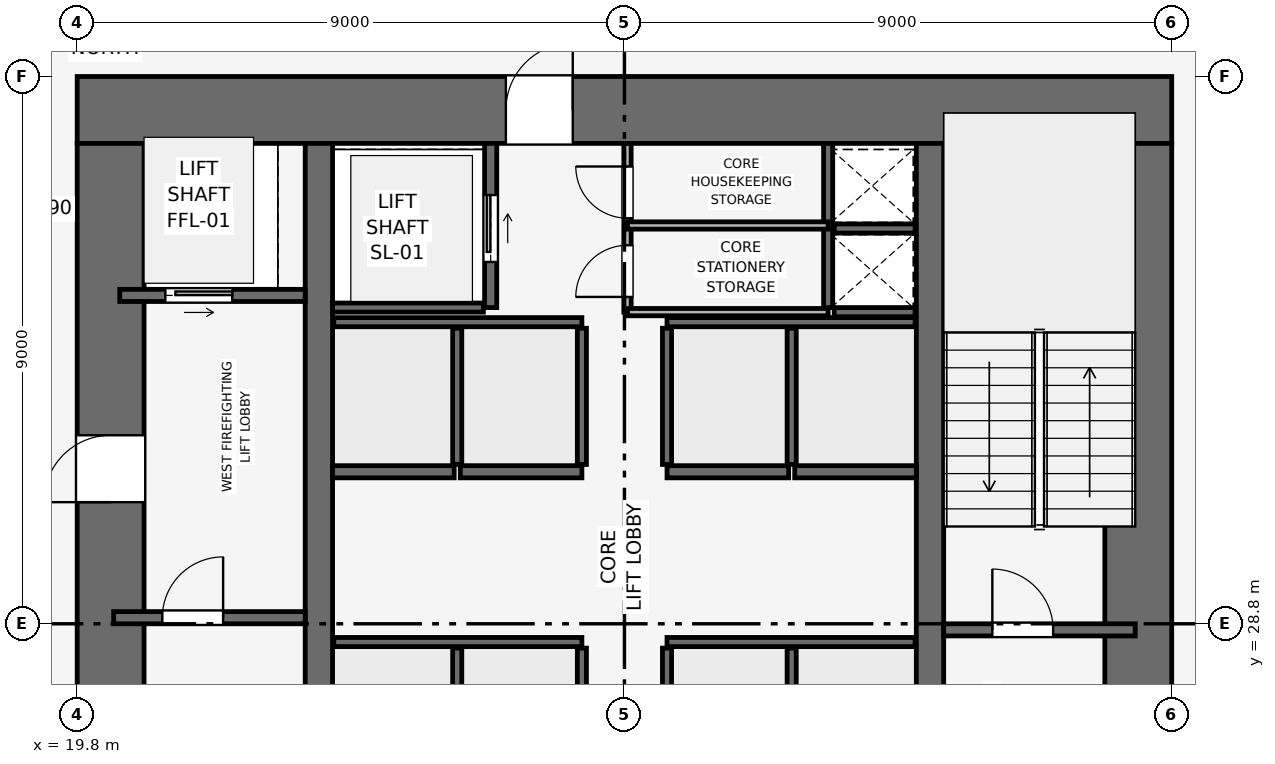
"""IFC4 building model, lengths in metres.
Left out: names, types, materials, properties, quantities, classifications, styles, units other than length and angle.
Written with IfcOpenShell. Run it as: python <this file> out.ifc"""

import sys

from ifc_helpers import new_model, si_unit, direction, frame, frame_2d, origin, place, context, subcontext, project, spatial, rectangle, extrude, element, fill, save


model = new_model("IFC4")
c1 = context("Model", 3, precision=1e-05, world=origin(), true_north=direction((0.0, 1.0)))
c2 = subcontext(c1, "Body", "Model", "MODEL_VIEW")
j1 = project(units=[si_unit("LENGTHUNIT", "METRE"), si_unit("PLANEANGLEUNIT", "RADIAN")], contexts=[c1])
p1 = place(None, origin())
s1 = spatial("IfcSite", under=j1, at=p1, CompositionType="ELEMENT")
p2 = place(p1, origin())
s2 = spatial("IfcBuilding", under=s1, at=p2, CompositionType="ELEMENT")
p3 = place(p2, frame((0.0, 0.0, 57.3)))
s3 = spatial("IfcBuildingStorey", under=s2, at=p3, CompositionType="ELEMENT", Elevation=57.3)
p4 = place(p3, frame((19.8, 37.25, 0.0), z_axis=(0.0, 0.0, 1.0), x_axis=(1.0, 0.0, 0.0)))
e1 = element("IfcWall", 1, at=p4, inside=s3, PredefinedType="SHEAR", context=c2, shape_type="SweptSolid", body=[
    extrude(rectangle(XDim=18.0, YDim=1.1, at=frame_2d((9.0, 0.0))), origin(), (0.0, 0.0, 1.0), 3.9),
])
p5 = place(p4, frame((7.05, 0.0, 0.0)))
e2 = element("IfcOpeningElement", 2, at=p5, cuts=e1, PredefinedType="OPENING", context=c2, shape_type="SweptSolid", body=[
    extrude(rectangle(XDim=1.1, YDim=2.15, at=frame_2d((0.55, 1.075))), frame((0.0, 0.56, 0.0), z_axis=(0.0, -1.0, 0.0), x_axis=(1.0, 0.0, 0.0)), (0.0, 0.0, 1.0), 1.12),
])
p6 = place(p3, frame((20.35, 20.9, 0.0), z_axis=(0.0, 0.0, 1.0), x_axis=(0.0, 1.0, 0.0)))
e3 = element("IfcWall", 3, at=p6, inside=s3, PredefinedType="SHEAR", context=c2, shape_type="SweptSolid", body=[
    extrude(rectangle(XDim=15.8, YDim=1.1, at=frame_2d((7.9, 0.0))), origin(), (0.0, 0.0, 1.0), 3.9),
])
p7 = place(p6, frame((9.9, 0.0, 0.0)))
e4 = element("IfcOpeningElement", 4, at=p7, cuts=e3, PredefinedType="OPENING", context=c2, shape_type="SweptSolid", body=[
    extrude(rectangle(XDim=1.1, YDim=2.15, at=frame_2d((0.55, 1.075))), frame((0.0, 0.56, 0.0), z_axis=(0.0, -1.0, 0.0), x_axis=(1.0, 0.0, 0.0)), (0.0, 0.0, 1.0), 1.12),
])
p8 = place(p3, frame((37.25, 20.9, 0.0), z_axis=(0.0, 0.0, 1.0), x_axis=(0.0, 1.0, 0.0)))
e5 = element("IfcWall", 5, at=p8, inside=s3, PredefinedType="SHEAR", context=c2, shape_type="SweptSolid", body=[
    extrude(rectangle(XDim=15.8, YDim=1.1, at=frame_2d((7.9, 0.0))), origin(), (0.0, 0.0, 1.0), 3.9),
])
p9 = place(p8, frame((4.4, 0.0, 0.0)))
e6 = element("IfcOpeningElement", 6, at=p9, cuts=e5, PredefinedType="OPENING", context=c2, shape_type="SweptSolid", body=[
    extrude(rectangle(XDim=1.1, YDim=2.15, at=frame_2d((0.55, 1.075))), frame((0.0, 0.56, 0.0), z_axis=(0.0, -1.0, 0.0), x_axis=(1.0, 0.0, 0.0)), (0.0, 0.0, 1.0), 1.12),
])
for number, where, z_axis, x_axis in (
    (7, (23.775, 20.9, 0.0), (0.0, 0.0, 1.0), (0.0, 1.0, 0.0)),
    (8, (33.825, 20.9, 0.0), (0.0, 0.0, 1.0), (0.0, 1.0, 0.0)),
):
    element("IfcWall", number, at=place(p3, frame(where, z_axis=z_axis, x_axis=x_axis)), inside=s3, PredefinedType="SHEAR", context=c2, shape_type="SweptSolid", body=[
        extrude(rectangle(XDim=15.8, YDim=0.45, at=frame_2d((7.9, 0.0))), origin(), (0.0, 0.0, 1.0), 3.9),
    ])
p10 = place(p3, frame((20.4, 28.9, 0.0), z_axis=(0.0, 0.0, 1.0), x_axis=(1.0, 0.0, 0.0)))
e9 = element("IfcWall", 9, at=p10, inside=s3, PredefinedType="SHEAR", context=c2, shape_type="SweptSolid", body=[
    extrude(rectangle(XDim=3.15, YDim=0.2, at=frame_2d((1.575, 0.0))), origin(), (0.0, 0.0, 1.0), 3.65),
])
p11 = place(p10, frame((0.8, 0.0, 0.0)))
e10 = element("IfcOpeningElement", 10, at=p11, cuts=e9, PredefinedType="OPENING", context=c2, shape_type="SweptSolid", body=[
    extrude(rectangle(XDim=1.0, YDim=2.1, at=frame_2d((0.5, 1.05))), frame((0.0, 0.11, 0.0), z_axis=(0.0, -1.0, 0.0), x_axis=(1.0, 0.0, 0.0)), (0.0, 0.0, 1.0), 0.22),
])
p12 = place(p3, frame((34.05, 28.7, 0.0), z_axis=(0.0, 0.0, 1.0), x_axis=(1.0, 0.0, 0.0)))
e11 = element("IfcWall", 11, at=p12, inside=s3, PredefinedType="SHEAR", context=c2, shape_type="SweptSolid", body=[
    extrude(rectangle(XDim=3.15, YDim=0.2, at=frame_2d((1.575, 0.0))), origin(), (0.0, 0.0, 1.0), 3.65),
])
p13 = place(p12, frame((0.8, 0.0, 0.0)))
e12 = element("IfcOpeningElement", 12, at=p13, cuts=e11, PredefinedType="OPENING", context=c2, shape_type="SweptSolid", body=[
    extrude(rectangle(XDim=1.0, YDim=2.1, at=frame_2d((0.5, 1.05))), frame((0.0, 0.11, 0.0), z_axis=(0.0, -1.0, 0.0), x_axis=(1.0, 0.0, 0.0)), (0.0, 0.0, 1.0), 0.22),
])
p14 = place(p3, frame((32.15, 34.0, 0.0), z_axis=(0.0, 0.0, 1.0), x_axis=(0.0, 1.0, 0.0)))
e13 = element("IfcWall", 13, at=p14, inside=s3, PredefinedType="SHEAR", context=c2, shape_type="SweptSolid", body=[
    extrude(rectangle(XDim=2.7, YDim=0.15, at=frame_2d((1.35, 0.0))), origin(), (0.0, 0.0, 1.0), 3.65),
])
for number, where, z_axis, x_axis in (
    (14, (32.25, 33.925, 0.0), (0.0, 0.0, 1.0), (1.0, 0.0, 0.0)),
    (15, (32.25, 35.3, 0.0), (0.0, 0.0, 1.0), (1.0, 0.0, 0.0)),
):
    element("IfcWall", number, at=place(p3, frame(where, z_axis=z_axis, x_axis=x_axis)), inside=s3, PredefinedType="SHEAR", context=c2, shape_type="SweptSolid", body=[
        extrude(rectangle(XDim=1.33, YDim=0.15, at=frame_2d((0.665, 0.0))), origin(), (0.0, 0.0, 1.0), 3.65),
    ])
p15 = place(p3, frame((20.5, 34.2, 0.0), z_axis=(0.0, 0.0, 1.0), x_axis=(1.0, 0.0, 0.0)))
e16 = element("IfcWall", 16, at=p15, inside=s3, PredefinedType="SHEAR", context=c2, shape_type="SweptSolid", body=[
    extrude(rectangle(XDim=3.05, YDim=0.2, at=frame_2d((1.525, 0.0))), origin(), (0.0, 0.0, 1.0), 3.65),
])
p16 = place(p15, frame((0.75, 0.0, 0.0)))
e17 = element("IfcOpeningElement", 17, at=p16, cuts=e16, PredefinedType="OPENING", context=c2, shape_type="SweptSolid", body=[
    extrude(rectangle(XDim=1.1, YDim=2.15, at=frame_2d((0.55, 1.075))), frame((0.0, 0.11, 0.0), z_axis=(0.0, -1.0, 0.0), x_axis=(1.0, 0.0, 0.0)), (0.0, 0.0, 1.0), 0.22),
])
p17 = place(p3, frame((26.6, 34.0, 0.0), z_axis=(0.0, 0.0, 1.0), x_axis=(0.0, 1.0, 0.0)))
e18 = element("IfcWall", 18, at=p17, inside=s3, PredefinedType="SHEAR", context=c2, shape_type="SweptSolid", body=[
    extrude(rectangle(XDim=2.7, YDim=0.2, at=frame_2d((1.35, 0.0))), origin(), (0.0, 0.0, 1.0), 3.65),
])
p18 = place(p17, frame((0.75, 0.0, 0.0)))
e19 = element("IfcOpeningElement", 19, at=p18, cuts=e18, PredefinedType="OPENING", context=c2, shape_type="SweptSolid", body=[
    extrude(rectangle(XDim=1.1, YDim=2.15, at=frame_2d((0.55, 1.075))), frame((0.0, 0.11, 0.0), z_axis=(0.0, -1.0, 0.0), x_axis=(1.0, 0.0, 0.0)), (0.0, 0.0, 1.0), 0.22),
])
p19 = place(p3, frame((24.0, 34.0, 0.0), z_axis=(0.0, 0.0, 1.0), x_axis=(1.0, 0.0, 0.0)))
e20 = element("IfcWall", 20, at=p19, inside=s3, PredefinedType="SHEAR", context=c2, shape_type="SweptSolid", body=[
    extrude(rectangle(XDim=2.48, YDim=0.15, at=frame_2d((1.24, 0.0))), origin(), (0.0, 0.0, 1.0), 3.65),
])
for number, where, z_axis, x_axis in (
    (21, (24.0, 31.3, 0.0), (0.0, 0.0, 1.0), (1.0, 0.0, 0.0)),
    (22, (26.1, 31.3, 0.0), (0.0, 0.0, 1.0), (1.0, 0.0, 0.0)),
    (23, (29.5, 31.3, 0.0), (0.0, 0.0, 1.0), (1.0, 0.0, 0.0)),
    (24, (31.6, 31.3, 0.0), (0.0, 0.0, 1.0), (1.0, 0.0, 0.0)),
):
    element("IfcWall", number, at=place(p3, frame(where, z_axis=z_axis, x_axis=x_axis)), inside=s3, PredefinedType="SHEAR", context=c2, shape_type="SweptSolid", body=[
        extrude(rectangle(XDim=2.0, YDim=0.2, at=frame_2d((1.0, 0.0))), origin(), (0.0, 0.0, 1.0), 3.65),
    ])
for number, where, z_axis, x_axis in (
    (25, (24.02, 28.5, 0.0), (0.0, 0.0, 1.0), (1.0, 0.0, 0.0)),
    (26, (29.5, 28.5, 0.0), (0.0, 0.0, 1.0), (1.0, 0.0, 0.0)),
):
    element("IfcWall", number, at=place(p3, frame(where, z_axis=z_axis, x_axis=x_axis)), inside=s3, PredefinedType="SHEAR", context=c2, shape_type="SweptSolid", body=[
        extrude(rectangle(XDim=4.08, YDim=0.15, at=frame_2d((2.04, 0.0))), origin(), (0.0, 0.0, 1.0), 3.65),
    ])
for number, where, z_axis, x_axis in (
    (27, (26.05, 26.12, 0.0), (0.0, 0.0, 1.0), (0.0, 1.0, 0.0)),
    (28, (28.1, 26.12, 0.0), (0.0, 0.0, 1.0), (0.0, 1.0, 0.0)),
    (29, (29.5, 26.12, 0.0), (0.0, 0.0, 1.0), (0.0, 1.0, 0.0)),
    (30, (31.55, 26.12, 0.0), (0.0, 0.0, 1.0), (0.0, 1.0, 0.0)),
):
    element("IfcWall", number, at=place(p3, frame(where, z_axis=z_axis, x_axis=x_axis)), inside=s3, PredefinedType="SHEAR", context=c2, shape_type="SweptSolid", body=[
        extrude(rectangle(XDim=2.28, YDim=0.15, at=frame_2d((1.14, 0.0))), origin(), (0.0, 0.0, 1.0), 3.65),
    ])
for number, where, z_axis, x_axis in (
    (31, (24.02, 33.76, 0.0), (0.0, 0.0, 1.0), (1.0, 0.0, 0.0)),
    (32, (29.5, 33.76, 0.0), (0.0, 0.0, 1.0), (1.0, 0.0, 0.0)),
):
    element("IfcWall", number, at=place(p3, frame(where, z_axis=z_axis, x_axis=x_axis)), inside=s3, PredefinedType="SHEAR", context=c2, shape_type="SweptSolid", body=[
        extrude(rectangle(XDim=4.08, YDim=0.15, at=frame_2d((2.04, 0.0))), origin(), (0.0, 0.0, 1.0), 3.65),
    ])
for number, where, z_axis, x_axis in (
    (33, (26.05, 31.42, 0.0), (0.0, 0.0, 1.0), (0.0, 1.0, 0.0)),
    (34, (28.1, 31.42, 0.0), (0.0, 0.0, 1.0), (0.0, 1.0, 0.0)),
    (35, (29.5, 31.42, 0.0), (0.0, 0.0, 1.0), (0.0, 1.0, 0.0)),
    (36, (31.55, 31.42, 0.0), (0.0, 0.0, 1.0), (0.0, 1.0, 0.0)),
):
    element("IfcWall", number, at=place(p3, frame(where, z_axis=z_axis, x_axis=x_axis)), inside=s3, PredefinedType="SHEAR", context=c2, shape_type="SweptSolid", body=[
        extrude(rectangle(XDim=2.24, YDim=0.15, at=frame_2d((1.12, 0.0))), origin(), (0.0, 0.0, 1.0), 3.65),
    ])
p20 = place(p3, frame((28.85, 33.925, 0.0), z_axis=(0.0, 0.0, 1.0), x_axis=(0.0, 1.0, 0.0)))
e37 = element("IfcWall", 37, at=p20, inside=s3, PredefinedType="PARTITIONING", context=c2, shape_type="SweptSolid", body=[
    extrude(rectangle(XDim=2.775, YDim=0.12, at=frame_2d((1.387, 0.0))), origin(), (0.0, 0.0, 1.0), 3.65),
])
p21 = place(p20, frame((0.25, 0.0, 0.0)))
e38 = element("IfcOpeningElement", 38, at=p21, cuts=e37, PredefinedType="OPENING", context=c2, shape_type="SweptSolid", body=[
    extrude(rectangle(XDim=0.85, YDim=2.1, at=frame_2d((0.425, 1.05))), frame((0.0, 0.07, 0.0), z_axis=(0.0, -1.0, 0.0), x_axis=(1.0, 0.0, 0.0)), (0.0, 0.0, 1.0), 0.14),
])
p22 = place(p20, frame((1.545, 0.0, 0.0)))
e39 = element("IfcOpeningElement", 39, at=p22, cuts=e37, PredefinedType="OPENING", context=c2, shape_type="SweptSolid", body=[
    extrude(rectangle(XDim=0.85, YDim=2.1, at=frame_2d((0.425, 1.05))), frame((0.0, 0.07, 0.0), z_axis=(0.0, -1.0, 0.0), x_axis=(1.0, 0.0, 0.0)), (0.0, 0.0, 1.0), 0.14),
])
for number, where, z_axis, x_axis in (
    (40, (28.85, 35.35, 0.0), (0.0, 0.0, 1.0), (1.0, 0.0, 0.0)),
    (41, (28.85, 33.925, 0.0), (0.0, 0.0, 1.0), (1.0, 0.0, 0.0)),
):
    element("IfcWall", number, at=place(p3, frame(where, z_axis=z_axis, x_axis=x_axis)), inside=s3, PredefinedType="PARTITIONING", context=c2, shape_type="SweptSolid", body=[
        extrude(rectangle(XDim=3.3, YDim=0.12, at=frame_2d((1.65, 0.0))), origin(), (0.0, 0.0, 1.0), 3.65),
    ])
p23 = place(p11, origin())
e42 = element("IfcDoor", 42, at=p23, inside=s3, OperationType="SINGLE_SWING_RIGHT", PredefinedType="DOOR", context=c2, shape_type="SweptSolid", body=[
    extrude(rectangle(XDim=1.0, YDim=2.1, at=frame_2d((0.5, 1.05))), frame((0.0, 0.025, 0.0), z_axis=(0.0, -1.0, 0.0), x_axis=(1.0, 0.0, 0.0)), (0.0, 0.0, 1.0), 0.05),
])
fill(e10, e42)
p24 = place(p13, origin())
e43 = element("IfcDoor", 43, at=p24, inside=s3, OperationType="SINGLE_SWING_LEFT", PredefinedType="DOOR", context=c2, shape_type="SweptSolid", body=[
    extrude(rectangle(XDim=1.0, YDim=2.1, at=frame_2d((0.5, 1.05))), frame((0.0, 0.025, 0.0), z_axis=(0.0, -1.0, 0.0), x_axis=(1.0, 0.0, 0.0)), (0.0, 0.0, 1.0), 0.05),
])
fill(e12, e43)
p25 = place(p16, origin())
e44 = element("IfcDoor", 44, at=p25, inside=s3, OperationType="SLIDING_TO_RIGHT", PredefinedType="DOOR", context=c2, shape_type="SweptSolid", body=[
    extrude(rectangle(XDim=1.1, YDim=2.15, at=frame_2d((0.55, 1.075))), frame((0.0, 0.025, 0.0), z_axis=(0.0, -1.0, 0.0), x_axis=(1.0, 0.0, 0.0)), (0.0, 0.0, 1.0), 0.05),
])
fill(e17, e44)
p26 = place(p18, origin())
e45 = element("IfcDoor", 45, at=p26, inside=s3, OperationType="SLIDING_TO_RIGHT", PredefinedType="DOOR", context=c2, shape_type="SweptSolid", body=[
    extrude(rectangle(XDim=1.1, YDim=2.15, at=frame_2d((0.55, 1.075))), frame((0.0, 0.025, 0.0), z_axis=(0.0, -1.0, 0.0), x_axis=(1.0, 0.0, 0.0)), (0.0, 0.0, 1.0), 0.05),
])
fill(e19, e45)
p27 = place(p21, origin())
e46 = element("IfcDoor", 46, at=p27, inside=s3, OperationType="SINGLE_SWING_LEFT", PredefinedType="DOOR", context=c2, shape_type="SweptSolid", body=[
    extrude(rectangle(XDim=0.85, YDim=2.1, at=frame_2d((0.425, 1.05))), frame((0.0, 0.025, 0.0), z_axis=(0.0, -1.0, 0.0), x_axis=(1.0, 0.0, 0.0)), (0.0, 0.0, 1.0), 0.05),
])
fill(e38, e46)
p28 = place(p22, origin())
e47 = element("IfcDoor", 47, at=p28, inside=s3, OperationType="SINGLE_SWING_RIGHT", PredefinedType="DOOR", context=c2, shape_type="SweptSolid", body=[
    extrude(rectangle(XDim=0.85, YDim=2.1, at=frame_2d((0.425, 1.05))), frame((0.0, 0.025, 0.0), z_axis=(0.0, -1.0, 0.0), x_axis=(1.0, 0.0, 0.0)), (0.0, 0.0, 1.0), 0.05),
])
fill(e39, e47)
p29 = place(p7, origin())
e48 = element("IfcDoor", 48, at=p29, inside=s3, OperationType="SINGLE_SWING_LEFT", PredefinedType="DOOR", context=c2, shape_type="SweptSolid", body=[
    extrude(rectangle(XDim=1.1, YDim=2.15, at=frame_2d((0.55, 1.075))), frame((0.0, 0.025, 0.0), z_axis=(0.0, -1.0, 0.0), x_axis=(1.0, 0.0, 0.0)), (0.0, 0.0, 1.0), 0.05),
])
fill(e4, e48)
p30 = place(p5, origin())
e49 = element("IfcDoor", 49, at=p30, inside=s3, OperationType="SINGLE_SWING_RIGHT", PredefinedType="DOOR", context=c2, shape_type="SweptSolid", body=[
    extrude(rectangle(XDim=1.1, YDim=2.15, at=frame_2d((0.55, 1.075))), frame((0.0, 0.025, 0.0), z_axis=(0.0, -1.0, 0.0), x_axis=(1.0, 0.0, 0.0)), (0.0, 0.0, 1.0), 0.05),
])
fill(e2, e49)
save(model, sys.argv[1])
